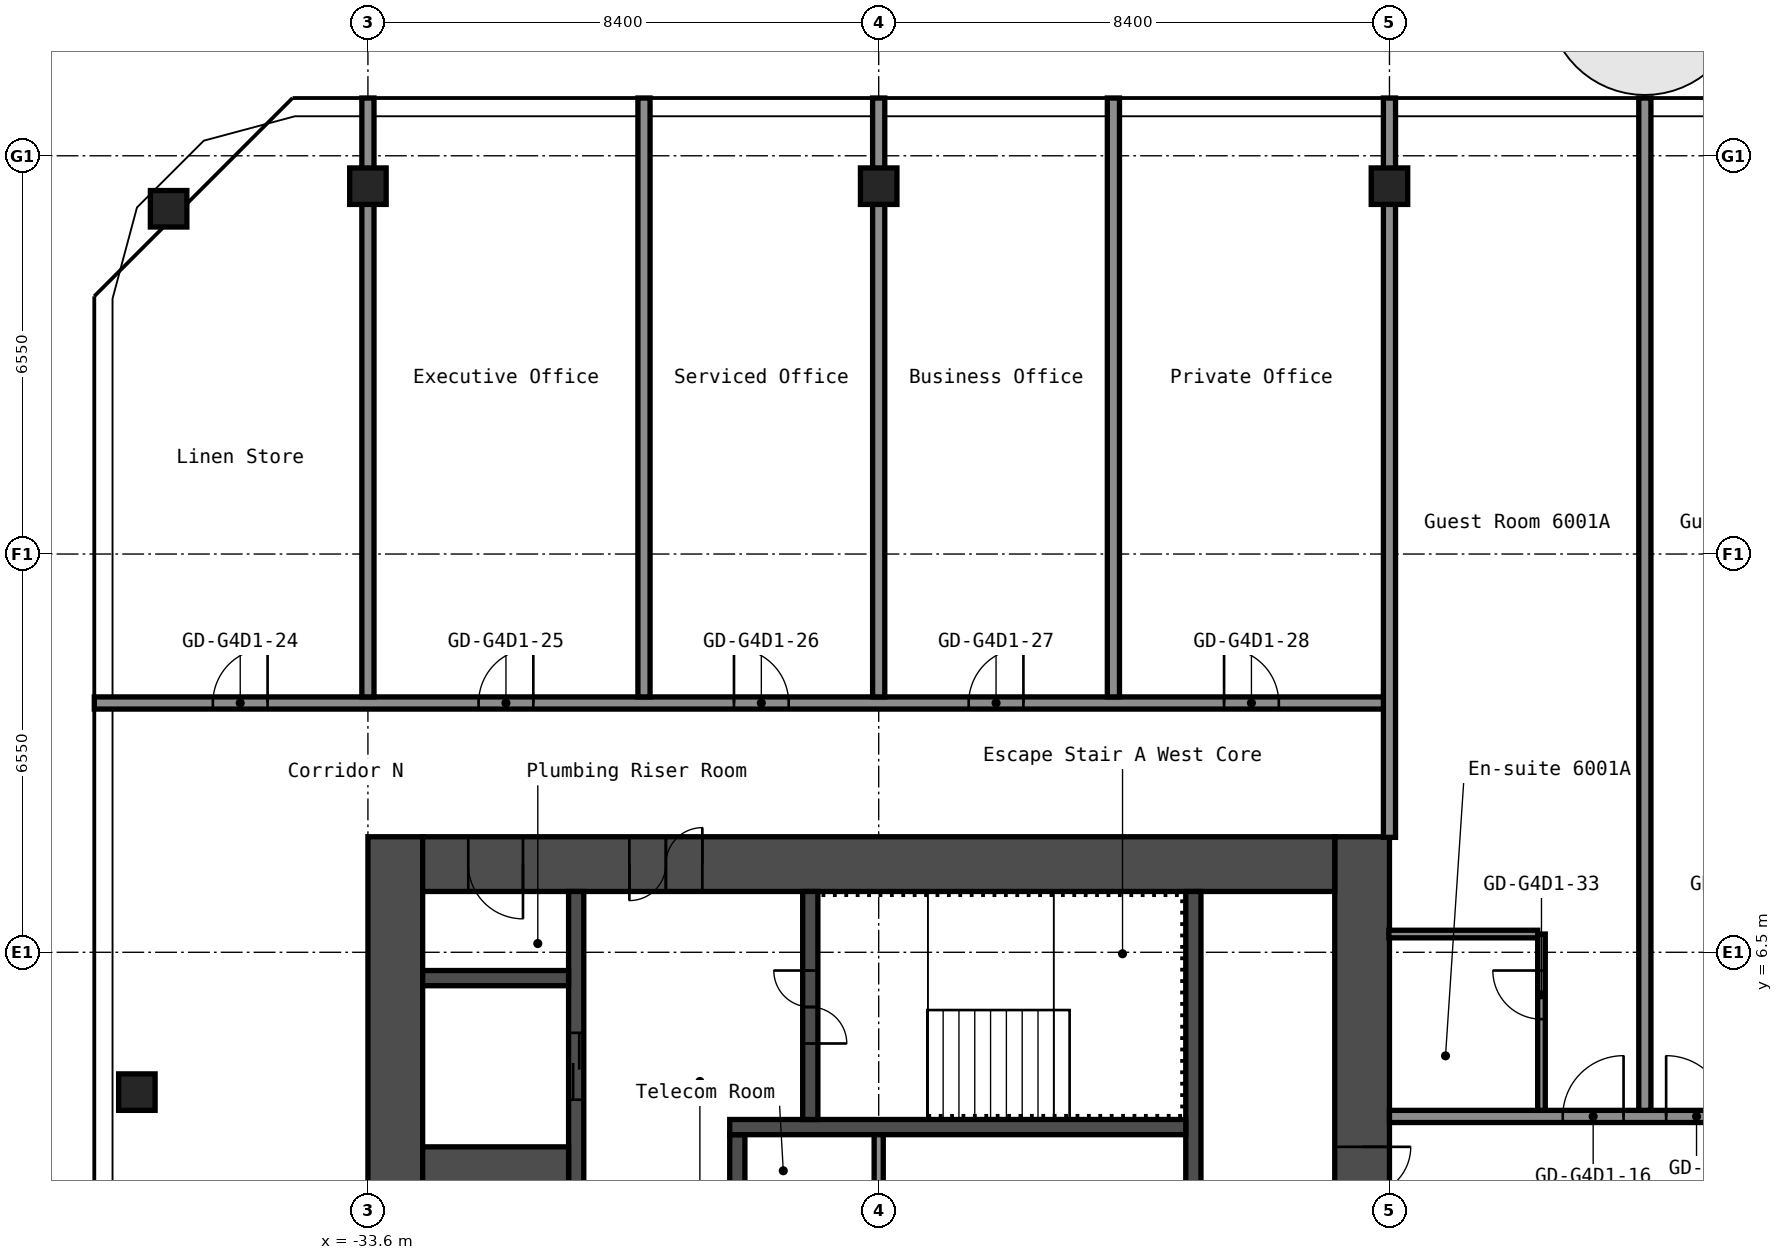
"""IFC4 building model, lengths in metres.
Left out: names, types, materials, properties, quantities, classifications, styles, units other than length and angle.
Written with IfcOpenShell. Run it as: python <this file> out.ifc"""

import sys

from ifc_helpers import new_model, si_unit, direction, frame, frame_2d, origin, origin_2d, place, context, subcontext, project, spatial, rectangle, hollow_rectangle, extrude, element, fill, save


model = new_model("IFC4")
c1 = context("Model", 3, precision=1e-05, world=origin(), true_north=direction((0.0, 1.0)))
c2 = subcontext(c1, "Body", "Model", "MODEL_VIEW")
j1 = project(units=[si_unit("LENGTHUNIT", "METRE"), si_unit("PLANEANGLEUNIT", "RADIAN")], contexts=[c1])
p1 = place(None, origin())
s1 = spatial("IfcSite", under=j1, at=p1, CompositionType="ELEMENT")
p2 = place(p1, origin())
s2 = spatial("IfcBuilding", under=s1, at=p2, CompositionType="ELEMENT")
p3 = place(p2, frame((0.0, 0.0, 212.2)))
s3 = spatial("IfcBuildingStorey", under=s2, at=p3, CompositionType="ELEMENT", Elevation=212.2)
for number, where, z_axis, x_axis in (
    (1, (-37.4, 4.2, 0.0), (0.0, 0.0, 1.0), (1.0, 0.0, 0.0)),
    (2, (-36.878, 18.729, 0.0), (0.0, 0.0, 1.0), (1.0, 0.0, 0.0)),
    (3, (-33.6, 19.1, 0.0), (0.0, 0.0, 1.0), (1.0, 0.0, 0.0)),
    (4, (-25.2, 19.1, 0.0), (0.0, 0.0, 1.0), (1.0, 0.0, 0.0)),
    (5, (-16.8, 19.1, 0.0), (0.0, 0.0, 1.0), (1.0, 0.0, 0.0)),
):
    element("IfcColumn", number, at=place(p3, frame(where, z_axis=z_axis, x_axis=x_axis)), inside=s3, PredefinedType="COLUMN", context=c2, shape_type="SweptSolid", body=[
        extrude(hollow_rectangle(XDim=0.6, YDim=0.6, WallThickness=0.025, InnerFilletRadius=0.038, OuterFilletRadius=0.062, at=origin_2d()), origin(), (0.0, 0.0, 1.0), 2.75),
    ])
p4 = place(p3, frame((-17.25, -8.4, 0.0), z_axis=(0.0, 0.0, 1.0), x_axis=(0.0, 1.0, 0.0)))
e6 = element("IfcWall", 6, at=p4, inside=s3, PredefinedType="SHEAR", context=c2, shape_type="SweptSolid", body=[
    extrude(rectangle(XDim=16.8, YDim=0.9, at=frame_2d((8.4, 0.0))), origin(), (0.0, 0.0, 1.0), 2.75),
])
p5 = place(p4, frame((10.1, 0.0, 0.0)))
e7 = element("IfcOpeningElement", 7, at=p5, cuts=e6, PredefinedType="OPENING", context=c2, shape_type="SweptSolid", body=[
    extrude(rectangle(XDim=1.6, YDim=2.1, at=frame_2d((0.8, 1.05))), frame((0.0, 0.46, 0.0), z_axis=(0.0, -1.0, 0.0), x_axis=(1.0, 0.0, 0.0)), (0.0, 0.0, 1.0), 0.92),
])
p6 = place(p3, frame((-33.15, -8.4, 0.0), z_axis=(0.0, 0.0, 1.0), x_axis=(0.0, 1.0, 0.0)))
e8 = element("IfcWall", 8, at=p6, inside=s3, PredefinedType="SHEAR", context=c2, shape_type="SweptSolid", body=[
    extrude(rectangle(XDim=16.8, YDim=0.9, at=frame_2d((8.4, 0.0))), origin(), (0.0, 0.0, 1.0), 2.75),
])
p7 = place(p3, frame((-32.7, 7.95, 0.0), z_axis=(0.0, 0.0, 1.0), x_axis=(1.0, 0.0, 0.0)))
e9 = element("IfcWall", 9, at=p7, inside=s3, PredefinedType="SHEAR", context=c2, shape_type="SweptSolid", body=[
    extrude(rectangle(XDim=15.0, YDim=0.9, at=frame_2d((7.5, 0.0))), origin(), (0.0, 0.0, 1.0), 2.75),
])
p8 = place(p7, frame((3.4, 0.0, 0.0)))
e10 = element("IfcOpeningElement", 10, at=p8, cuts=e9, PredefinedType="OPENING", context=c2, shape_type="SweptSolid", body=[
    extrude(rectangle(XDim=1.2, YDim=2.1, at=frame_2d((0.6, 1.05))), frame((0.0, 0.46, 0.0), z_axis=(0.0, -1.0, 0.0), x_axis=(1.0, 0.0, 0.0)), (0.0, 0.0, 1.0), 0.92),
])
p9 = place(p7, frame((0.75, 0.0, 0.0)))
e11 = element("IfcOpeningElement", 11, at=p9, cuts=e9, PredefinedType="OPENING", context=c2, shape_type="SweptSolid", body=[
    extrude(rectangle(XDim=0.9, YDim=2.1, at=frame_2d((0.45, 1.05))), frame((0.0, 0.46, 0.0), z_axis=(0.0, -1.0, 0.0), x_axis=(1.0, 0.0, 0.0)), (0.0, 0.0, 1.0), 0.92),
])
p10 = place(p3, frame((-20.025, 1.2, 0.0), z_axis=(0.0, 0.0, 1.0), x_axis=(0.0, 1.0, 0.0)))
e12 = element("IfcWall", 12, at=p10, inside=s3, PredefinedType="SHEAR", context=c2, shape_type="SweptSolid", body=[
    extrude(rectangle(XDim=6.3, YDim=0.25, at=frame_2d((3.15, 0.0))), origin(), (0.0, 0.0, 1.0), 2.75),
])
p11 = place(p3, frame((-27.525, 1.45, 0.0), z_axis=(0.0, 0.0, 1.0), x_axis=(0.0, 1.0, 0.0)))
e13 = element("IfcWall", 13, at=p11, inside=s3, PredefinedType="SHEAR", context=c2, shape_type="SweptSolid", body=[
    extrude(rectangle(XDim=2.05, YDim=0.25, at=frame_2d((1.025, 0.0))), origin(), (0.0, 0.0, 1.0), 2.75),
])
p12 = place(p3, frame((-27.65, 3.625, 0.0), z_axis=(0.0, 0.0, 1.0), x_axis=(1.0, 0.0, 0.0)))
e14 = element("IfcWall", 14, at=p12, inside=s3, PredefinedType="SHEAR", context=c2, shape_type="SweptSolid", body=[
    extrude(rectangle(XDim=7.5, YDim=0.25, at=frame_2d((3.75, 0.0))), origin(), (0.0, 0.0, 1.0), 2.75),
])
p13 = place(p3, frame((-26.325, 3.75, 0.0), z_axis=(0.0, 0.0, 1.0), x_axis=(0.0, 1.0, 0.0)))
e15 = element("IfcWall", 15, at=p13, inside=s3, PredefinedType="SHEAR", context=c2, shape_type="SweptSolid", body=[
    extrude(rectangle(XDim=3.75, YDim=0.25, at=frame_2d((1.875, 0.0))), origin(), (0.0, 0.0, 1.0), 2.75),
])
p14 = place(p13, frame((1.25, 0.0, 0.0)))
e16 = element("IfcOpeningElement", 16, at=p14, cuts=e15, PredefinedType="OPENING", context=c2, shape_type="SweptSolid", body=[
    extrude(rectangle(XDim=1.2, YDim=2.1, at=frame_2d((0.6, 1.05))), frame((0.0, 0.135, 0.0), z_axis=(0.0, -1.0, 0.0), x_axis=(1.0, 0.0, 0.0)), (0.0, 0.0, 1.0), 0.27),
])
p15 = place(p3, frame((-30.175, 1.45, 0.0), z_axis=(0.0, 0.0, 1.0), x_axis=(0.0, 1.0, 0.0)))
e17 = element("IfcWall", 17, at=p15, inside=s3, PredefinedType="SHEAR", context=c2, shape_type="SweptSolid", body=[
    extrude(rectangle(XDim=6.05, YDim=0.25, at=frame_2d((3.025, 0.0))), origin(), (0.0, 0.0, 1.0), 2.75),
])
p16 = place(p15, frame((2.625, 0.0, 0.0)))
e18 = element("IfcOpeningElement", 18, at=p16, cuts=e17, PredefinedType="OPENING", context=c2, shape_type="SweptSolid", body=[
    extrude(rectangle(XDim=1.1, YDim=2.1, at=frame_2d((0.55, 1.05))), frame((0.0, 0.135, 0.0), z_axis=(0.0, -1.0, 0.0), x_axis=(1.0, 0.0, 0.0)), (0.0, 0.0, 1.0), 0.27),
])
p17 = place(p3, frame((-32.7, 2.375, 0.0), z_axis=(0.0, 0.0, 1.0), x_axis=(1.0, 0.0, 0.0)))
e19 = element("IfcWall", 19, at=p17, inside=s3, PredefinedType="SHEAR", context=c2, shape_type="SweptSolid", body=[
    extrude(rectangle(XDim=2.4, YDim=1.85, at=frame_2d((1.2, 0.0))), origin(), (0.0, 0.0, 1.0), 2.75),
])
p18 = place(p3, frame((-32.7, 6.075, 0.0), z_axis=(0.0, 0.0, 1.0), x_axis=(1.0, 0.0, 0.0)))
e20 = element("IfcWall", 20, at=p18, inside=s3, PredefinedType="SHEAR", context=c2, shape_type="SweptSolid", body=[
    extrude(rectangle(XDim=2.4, YDim=0.25, at=frame_2d((1.2, 0.0))), origin(), (0.0, 0.0, 1.0), 2.75),
])
p19 = place(p3, frame((-25.2, 1.45, 0.0), z_axis=(0.0, 0.0, 1.0), x_axis=(0.0, 1.0, 0.0)))
e21 = element("IfcWall", 21, at=p19, inside=s3, PredefinedType="PARTITIONING", context=c2, shape_type="SweptSolid", body=[
    extrude(rectangle(XDim=2.05, YDim=0.15, at=frame_2d((1.025, 0.0))), origin(), (0.0, 0.0, 1.0), 2.75),
])
p20 = place(p3, frame((-16.8, 3.8, 0.0), z_axis=(0.0, 0.0, 1.0), x_axis=(1.0, 0.0, 0.0)))
e22 = element("IfcWall", 22, at=p20, inside=s3, PredefinedType="PARTITIONING", context=c2, shape_type="SweptSolid", body=[
    extrude(rectangle(XDim=33.6, YDim=0.2, at=frame_2d((16.8, 0.0))), origin(), (0.0, 0.0, 1.0), 2.75),
])
p21 = place(p20, frame((2.85, 0.0, 0.0)))
e23 = element("IfcOpeningElement", 23, at=p21, cuts=e22, PredefinedType="OPENING", context=c2, shape_type="SweptSolid", body=[
    extrude(rectangle(XDim=1.0, YDim=2.1, at=frame_2d((0.5, 1.05))), frame((0.0, 0.11, 0.0), z_axis=(0.0, -1.0, 0.0), x_axis=(1.0, 0.0, 0.0)), (0.0, 0.0, 1.0), 0.22),
])
p22 = place(p20, frame((4.55, 0.0, 0.0)))
e24 = element("IfcOpeningElement", 24, at=p22, cuts=e22, PredefinedType="OPENING", context=c2, shape_type="SweptSolid", body=[
    extrude(rectangle(XDim=1.0, YDim=2.1, at=frame_2d((0.5, 1.05))), frame((0.0, 0.11, 0.0), z_axis=(0.0, -1.0, 0.0), x_axis=(1.0, 0.0, 0.0)), (0.0, 0.0, 1.0), 0.22),
])
p23 = place(p20, frame((10.4, 0.0, 0.0)))
e25 = element("IfcOpeningElement", 25, at=p23, cuts=e22, PredefinedType="OPENING", context=c2, shape_type="SweptSolid", body=[
    extrude(rectangle(XDim=1.0, YDim=2.1, at=frame_2d((0.5, 1.05))), frame((0.0, 0.11, 0.0), z_axis=(0.0, -1.0, 0.0), x_axis=(1.0, 0.0, 0.0)), (0.0, 0.0, 1.0), 0.22),
])
p24 = place(p20, frame((19.65, 0.0, 0.0)))
e26 = element("IfcOpeningElement", 26, at=p24, cuts=e22, PredefinedType="OPENING", context=c2, shape_type="SweptSolid", body=[
    extrude(rectangle(XDim=1.0, YDim=2.1, at=frame_2d((0.5, 1.05))), frame((0.0, 0.11, 0.0), z_axis=(0.0, -1.0, 0.0), x_axis=(1.0, 0.0, 0.0)), (0.0, 0.0, 1.0), 0.22),
])
p25 = place(p20, frame((21.35, 0.0, 0.0)))
e27 = element("IfcOpeningElement", 27, at=p25, cuts=e22, PredefinedType="OPENING", context=c2, shape_type="SweptSolid", body=[
    extrude(rectangle(XDim=1.0, YDim=2.1, at=frame_2d((0.5, 1.05))), frame((0.0, 0.11, 0.0), z_axis=(0.0, -1.0, 0.0), x_axis=(1.0, 0.0, 0.0)), (0.0, 0.0, 1.0), 0.22),
])
p26 = place(p20, frame((27.2, 0.0, 0.0)))
e28 = element("IfcOpeningElement", 28, at=p26, cuts=e22, PredefinedType="OPENING", context=c2, shape_type="SweptSolid", body=[
    extrude(rectangle(XDim=1.0, YDim=2.1, at=frame_2d((0.5, 1.05))), frame((0.0, 0.11, 0.0), z_axis=(0.0, -1.0, 0.0), x_axis=(1.0, 0.0, 0.0)), (0.0, 0.0, 1.0), 0.22),
])
p27 = place(p3, frame((-16.81, 6.8, 0.0), z_axis=(0.0, 0.0, 1.0), x_axis=(1.0, 0.0, 0.0)))
e29 = element("IfcWall", 29, at=p27, inside=s3, PredefinedType="PARTITIONING", context=c2, shape_type="SweptSolid", body=[
    extrude(rectangle(XDim=2.448, YDim=0.125, at=frame_2d((1.224, 0.0))), origin(), (0.0, 0.0, 1.0), 2.75),
])
p28 = place(p3, frame((-38.1, 10.6, 0.0), z_axis=(0.0, 0.0, 1.0), x_axis=(1.0, 0.0, 0.0)))
e30 = element("IfcWall", 30, at=p28, inside=s3, PredefinedType="PARTITIONING", context=c2, shape_type="SweptSolid", body=[
    extrude(rectangle(XDim=21.3, YDim=0.2, at=frame_2d((10.65, 0.0))), origin(), (0.0, 0.0, 1.0), 2.75),
])
p29 = place(p28, frame((1.95, 0.0, 0.0)))
e31 = element("IfcOpeningElement", 31, at=p29, cuts=e30, PredefinedType="OPENING", context=c2, shape_type="SweptSolid", body=[
    extrude(rectangle(XDim=0.9, YDim=2.1, at=frame_2d((0.45, 1.05))), frame((0.0, 0.11, 0.0), z_axis=(0.0, -1.0, 0.0), x_axis=(1.0, 0.0, 0.0)), (0.0, 0.0, 1.0), 0.22),
])
p30 = place(p28, frame((6.32, 0.0, 0.0)))
e32 = element("IfcOpeningElement", 32, at=p30, cuts=e30, PredefinedType="OPENING", context=c2, shape_type="SweptSolid", body=[
    extrude(rectangle(XDim=0.9, YDim=2.1, at=frame_2d((0.45, 1.05))), frame((0.0, 0.11, 0.0), z_axis=(0.0, -1.0, 0.0), x_axis=(1.0, 0.0, 0.0)), (0.0, 0.0, 1.0), 0.22),
])
p31 = place(p28, frame((10.52, 0.0, 0.0)))
e33 = element("IfcOpeningElement", 33, at=p31, cuts=e30, PredefinedType="OPENING", context=c2, shape_type="SweptSolid", body=[
    extrude(rectangle(XDim=0.9, YDim=2.1, at=frame_2d((0.45, 1.05))), frame((0.0, 0.11, 0.0), z_axis=(0.0, -1.0, 0.0), x_axis=(1.0, 0.0, 0.0)), (0.0, 0.0, 1.0), 0.22),
])
p32 = place(p28, frame((14.38, 0.0, 0.0)))
e34 = element("IfcOpeningElement", 34, at=p32, cuts=e30, PredefinedType="OPENING", context=c2, shape_type="SweptSolid", body=[
    extrude(rectangle(XDim=0.9, YDim=2.1, at=frame_2d((0.45, 1.05))), frame((0.0, 0.11, 0.0), z_axis=(0.0, -1.0, 0.0), x_axis=(1.0, 0.0, 0.0)), (0.0, 0.0, 1.0), 0.22),
])
p33 = place(p28, frame((18.58, 0.0, 0.0)))
e35 = element("IfcOpeningElement", 35, at=p33, cuts=e30, PredefinedType="OPENING", context=c2, shape_type="SweptSolid", body=[
    extrude(rectangle(XDim=0.9, YDim=2.1, at=frame_2d((0.45, 1.05))), frame((0.0, 0.11, 0.0), z_axis=(0.0, -1.0, 0.0), x_axis=(1.0, 0.0, 0.0)), (0.0, 0.0, 1.0), 0.22),
])
for number, where, z_axis, x_axis in (
    (36, (-33.6, 10.7, 0.0), (0.0, 0.0, 1.0), (0.0, 1.0, 0.0)),
    (37, (-29.06, 10.7, 0.0), (0.0, 0.0, 1.0), (0.0, 1.0, 0.0)),
    (38, (-25.2, 10.7, 0.0), (0.0, 0.0, 1.0), (0.0, 1.0, 0.0)),
    (39, (-21.34, 10.7, 0.0), (0.0, 0.0, 1.0), (0.0, 1.0, 0.0)),
):
    element("IfcWall", number, at=place(p3, frame(where, z_axis=z_axis, x_axis=x_axis)), inside=s3, PredefinedType="PARTITIONING", context=c2, shape_type="SweptSolid", body=[
        extrude(rectangle(XDim=9.85, YDim=0.2, at=frame_2d((4.925, 0.0))), origin(), (0.0, 0.0, 1.0), 2.75),
    ])
p34 = place(p3, frame((-16.8, 8.39, 0.0), z_axis=(0.0, 0.0, 1.0), x_axis=(0.0, 1.0, 0.0)))
e40 = element("IfcWall", 40, at=p34, inside=s3, PredefinedType="PARTITIONING", context=c2, shape_type="SweptSolid", body=[
    extrude(rectangle(XDim=12.16, YDim=0.2, at=frame_2d((6.08, 0.0))), origin(), (0.0, 0.0, 1.0), 2.75),
])
p35 = place(p3, frame((-14.3, 3.9, 0.0), z_axis=(0.0, 0.0, 1.0), x_axis=(0.0, 1.0, 0.0)))
e41 = element("IfcWall", 41, at=p35, inside=s3, PredefinedType="PARTITIONING", context=c2, shape_type="SweptSolid", body=[
    extrude(rectangle(XDim=2.9, YDim=0.125, at=frame_2d((1.45, 0.0))), origin(), (0.0, 0.0, 1.0), 2.75),
])
p36 = place(p35, frame((1.5, 0.0, 0.0)))
e42 = element("IfcOpeningElement", 42, at=p36, cuts=e41, PredefinedType="OPENING", context=c2, shape_type="SweptSolid", body=[
    extrude(rectangle(XDim=0.8, YDim=2.1, at=frame_2d((0.4, 1.05))), frame((0.0, 0.073, 0.0), z_axis=(0.0, -1.0, 0.0), x_axis=(1.0, 0.0, 0.0)), (0.0, 0.0, 1.0), 0.145),
])
p37 = place(p3, frame((-12.6, 3.9, 0.0), z_axis=(0.0, 0.0, 1.0), x_axis=(0.0, 1.0, 0.0)))
e43 = element("IfcWall", 43, at=p37, inside=s3, PredefinedType="PARTITIONING", context=c2, shape_type="SweptSolid", body=[
    extrude(rectangle(XDim=16.65, YDim=0.2, at=frame_2d((8.325, 0.0))), origin(), (0.0, 0.0, 1.0), 2.75),
])
p38 = place(p5, origin())
e44 = element("IfcDoor", 44, at=p38, inside=s3, OperationType="DOUBLE_DOOR_SINGLE_SWING", PredefinedType="DOOR", context=c2, shape_type="SweptSolid", body=[
    extrude(rectangle(XDim=1.6, YDim=2.1, at=frame_2d((0.8, 1.05))), frame((0.0, 0.025, 0.0), z_axis=(0.0, -1.0, 0.0), x_axis=(1.0, 0.0, 0.0)), (0.0, 0.0, 1.0), 0.05),
])
fill(e7, e44)
p39 = place(p8, origin())
e45 = element("IfcDoor", 45, at=p39, inside=s3, OperationType="DOUBLE_DOOR_SINGLE_SWING", PredefinedType="DOOR", context=c2, shape_type="SweptSolid", body=[
    extrude(rectangle(XDim=1.2, YDim=2.1, at=frame_2d((0.6, 1.05))), frame((0.0, 0.025, 0.0), z_axis=(0.0, -1.0, 0.0), x_axis=(1.0, 0.0, 0.0)), (0.0, 0.0, 1.0), 0.05),
])
fill(e10, e45)
p40 = place(p9, origin())
e46 = element("IfcDoor", 46, at=p40, inside=s3, OperationType="SINGLE_SWING_RIGHT", PredefinedType="DOOR", context=c2, shape_type="SweptSolid", body=[
    extrude(rectangle(XDim=0.9, YDim=2.1, at=frame_2d((0.45, 1.05))), frame((0.0, 0.025, 0.0), z_axis=(0.0, -1.0, 0.0), x_axis=(1.0, 0.0, 0.0)), (0.0, 0.0, 1.0), 0.05),
])
fill(e11, e46)
p41 = place(p14, origin())
e47 = element("IfcDoor", 47, at=p41, inside=s3, OperationType="DOUBLE_DOOR_SINGLE_SWING", PredefinedType="DOOR", context=c2, shape_type="SweptSolid", body=[
    extrude(rectangle(XDim=1.2, YDim=2.1, at=frame_2d((0.6, 1.05))), frame((0.0, 0.025, 0.0), z_axis=(0.0, -1.0, 0.0), x_axis=(1.0, 0.0, 0.0)), (0.0, 0.0, 1.0), 0.05),
])
fill(e16, e47)
p42 = place(p16, origin())
e48 = element("IfcDoor", 48, at=p42, inside=s3, OperationType="DOUBLE_DOOR_SLIDING", PredefinedType="DOOR", context=c2, shape_type="SweptSolid", body=[
    extrude(rectangle(XDim=1.1, YDim=2.1, at=frame_2d((0.55, 1.05))), frame((0.0, 0.025, 0.0), z_axis=(0.0, -1.0, 0.0), x_axis=(1.0, 0.0, 0.0)), (0.0, 0.0, 1.0), 0.05),
])
fill(e18, e48)
p43 = place(p21, origin())
e49 = element("IfcDoor", 49, at=p43, inside=s3, OperationType="SINGLE_SWING_LEFT", PredefinedType="DOOR", context=c2, shape_type="SweptSolid", body=[
    extrude(rectangle(XDim=1.0, YDim=2.1, at=frame_2d((0.5, 1.05))), frame((0.0, 0.025, 0.0), z_axis=(0.0, -1.0, 0.0), x_axis=(1.0, 0.0, 0.0)), (0.0, 0.0, 1.0), 0.05),
])
fill(e23, e49)
p44 = place(p22, origin())
e50 = element("IfcDoor", 50, at=p44, inside=s3, OperationType="SINGLE_SWING_RIGHT", PredefinedType="DOOR", context=c2, shape_type="SweptSolid", body=[
    extrude(rectangle(XDim=1.0, YDim=2.1, at=frame_2d((0.5, 1.05))), frame((0.0, 0.025, 0.0), z_axis=(0.0, -1.0, 0.0), x_axis=(1.0, 0.0, 0.0)), (0.0, 0.0, 1.0), 0.05),
])
fill(e24, e50)
p45 = place(p29, origin())
e51 = element("IfcDoor", 51, at=p45, inside=s3, OperationType="SINGLE_SWING_LEFT", PredefinedType="DOOR", context=c2, shape_type="SweptSolid", body=[
    extrude(rectangle(XDim=0.9, YDim=2.1, at=frame_2d((0.45, 1.05))), frame((0.0, 0.025, 0.0), z_axis=(0.0, -1.0, 0.0), x_axis=(1.0, 0.0, 0.0)), (0.0, 0.0, 1.0), 0.05),
])
fill(e31, e51)
p46 = place(p30, origin())
e52 = element("IfcDoor", 52, at=p46, inside=s3, OperationType="SINGLE_SWING_LEFT", PredefinedType="DOOR", context=c2, shape_type="SweptSolid", body=[
    extrude(rectangle(XDim=0.9, YDim=2.1, at=frame_2d((0.45, 1.05))), frame((0.0, 0.025, 0.0), z_axis=(0.0, -1.0, 0.0), x_axis=(1.0, 0.0, 0.0)), (0.0, 0.0, 1.0), 0.05),
])
fill(e32, e52)
p47 = place(p31, origin())
e53 = element("IfcDoor", 53, at=p47, inside=s3, OperationType="SINGLE_SWING_RIGHT", PredefinedType="DOOR", context=c2, shape_type="SweptSolid", body=[
    extrude(rectangle(XDim=0.9, YDim=2.1, at=frame_2d((0.45, 1.05))), frame((0.0, 0.025, 0.0), z_axis=(0.0, -1.0, 0.0), x_axis=(1.0, 0.0, 0.0)), (0.0, 0.0, 1.0), 0.05),
])
fill(e33, e53)
p48 = place(p32, origin())
e54 = element("IfcDoor", 54, at=p48, inside=s3, OperationType="SINGLE_SWING_LEFT", PredefinedType="DOOR", context=c2, shape_type="SweptSolid", body=[
    extrude(rectangle(XDim=0.9, YDim=2.1, at=frame_2d((0.45, 1.05))), frame((0.0, 0.025, 0.0), z_axis=(0.0, -1.0, 0.0), x_axis=(1.0, 0.0, 0.0)), (0.0, 0.0, 1.0), 0.05),
])
fill(e34, e54)
p49 = place(p33, origin())
e55 = element("IfcDoor", 55, at=p49, inside=s3, OperationType="SINGLE_SWING_RIGHT", PredefinedType="DOOR", context=c2, shape_type="SweptSolid", body=[
    extrude(rectangle(XDim=0.9, YDim=2.1, at=frame_2d((0.45, 1.05))), frame((0.0, 0.025, 0.0), z_axis=(0.0, -1.0, 0.0), x_axis=(1.0, 0.0, 0.0)), (0.0, 0.0, 1.0), 0.05),
])
fill(e35, e55)
p50 = place(p36, origin())
e56 = element("IfcDoor", 56, at=p50, inside=s3, OperationType="SINGLE_SWING_LEFT", PredefinedType="DOOR", context=c2, shape_type="SweptSolid", body=[
    extrude(rectangle(XDim=0.8, YDim=2.1, at=frame_2d((0.4, 1.05))), frame((0.0, 0.025, 0.0), z_axis=(0.0, -1.0, 0.0), x_axis=(1.0, 0.0, 0.0)), (0.0, 0.0, 1.0), 0.05),
])
fill(e42, e56)
save(model, sys.argv[1])
